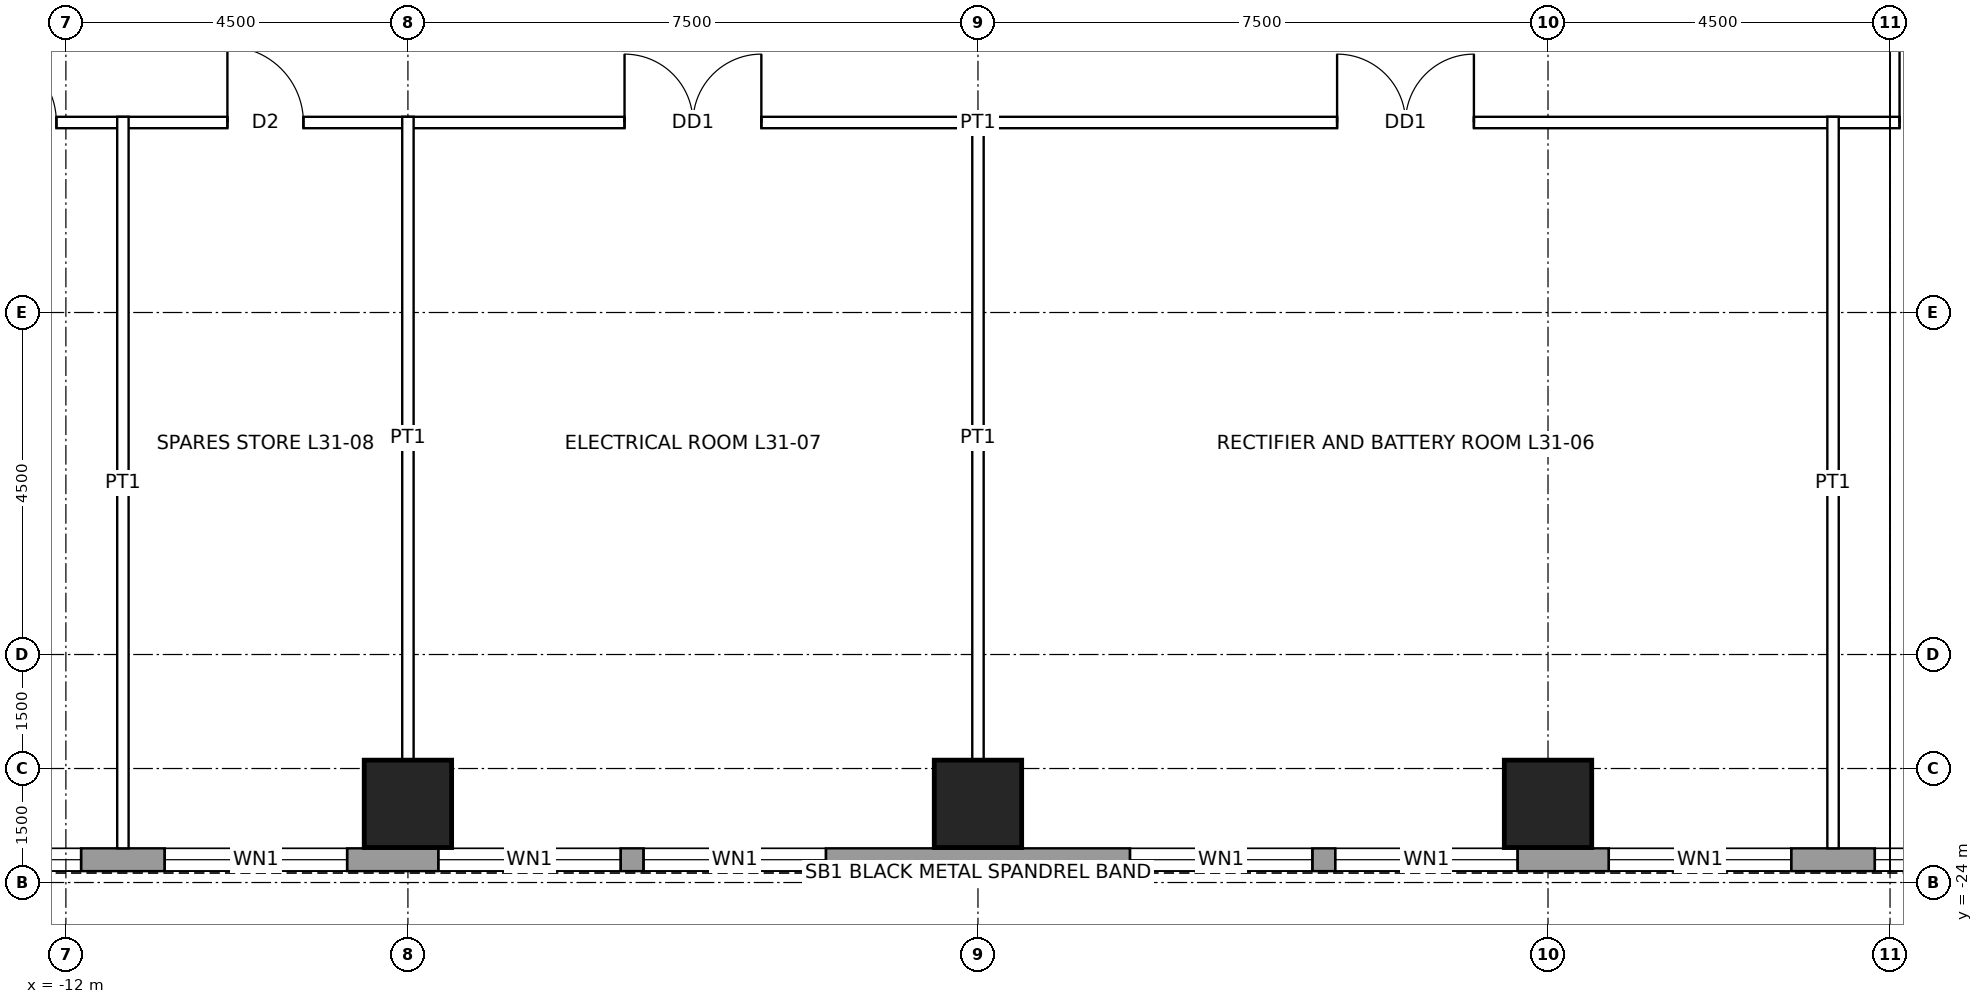
"""IFC4 building model, lengths in metres.
Left out: names, types, materials, properties, quantities, classifications, styles, units other than length and angle.
Written with IfcOpenShell. Run it as: python <this file> out.ifc"""

import sys

from ifc_helpers import new_model, si_unit, direction, frame, frame_2d, origin, origin_2d, place, context, subcontext, project, spatial, rectangle, hollow_rectangle, extrude, element, fill, save


model = new_model("IFC4")
c1 = context("Model", 3, precision=1e-05, world=origin(), true_north=direction((0.0, 1.0)))
c2 = subcontext(c1, "Body", "Model", "MODEL_VIEW")
j1 = project(units=[si_unit("LENGTHUNIT", "METRE"), si_unit("PLANEANGLEUNIT", "RADIAN")], contexts=[c1])
p1 = place(None, origin())
s1 = spatial("IfcSite", under=j1, at=p1, CompositionType="ELEMENT")
p2 = place(p1, origin())
s2 = spatial("IfcBuilding", under=s1, at=p2, CompositionType="ELEMENT")
p3 = place(p2, frame((0.0, 0.0, 153.9)))
s3 = spatial("IfcBuildingStorey", under=s2, at=p3, CompositionType="ELEMENT", Elevation=153.9)
for number, where, z_axis, x_axis in (
    (1, (7.5, -22.965, 0.0), (0.0, 0.0, 1.0), (1.0, 0.0, 0.0)),
    (2, (0.0, -22.965, 0.0), (0.0, 0.0, 1.0), (1.0, 0.0, 0.0)),
    (3, (-7.5, -22.965, 0.0), (0.0, 0.0, 1.0), (1.0, 0.0, 0.0)),
):
    element("IfcColumn", number, at=place(p3, frame(where, z_axis=z_axis, x_axis=x_axis)), inside=s3, PredefinedType="COLUMN", context=c2, shape_type="SweptSolid", body=[
        extrude(hollow_rectangle(XDim=1.15, YDim=1.15, WallThickness=0.075, at=origin_2d()), origin(), (0.0, 0.0, 1.0), 4.5),
    ])
p4 = place(p3, frame((16.2, -23.7, 0.0), z_axis=(0.0, 0.0, 1.0), x_axis=(-1.0, 0.0, 0.0)))
e4 = element("IfcWall", 4, at=p4, inside=s3, PredefinedType="SOLIDWALL", context=c2, shape_type="SweptSolid", body=[
    extrude(rectangle(XDim=32.4, YDim=0.3, at=frame_2d((16.2, 0.0))), origin(), (0.0, 0.0, 1.0), 4.3),
])
p5 = place(p4, frame((2.0, 0.0, 1.0)))
e5 = element("IfcOpeningElement", 5, at=p5, cuts=e4, PredefinedType="OPENING", context=c2, shape_type="SweptSolid", body=[
    extrude(rectangle(XDim=2.4, YDim=1.2, at=frame_2d((1.2, 0.6))), frame((0.0, 0.16, 0.0), z_axis=(0.0, -1.0, 0.0), x_axis=(1.0, 0.0, 0.0)), (0.0, 0.0, 1.0), 0.32),
])
p6 = place(p4, frame((5.5, 0.0, 1.0)))
e6 = element("IfcOpeningElement", 6, at=p6, cuts=e4, PredefinedType="OPENING", context=c2, shape_type="SweptSolid", body=[
    extrude(rectangle(XDim=2.4, YDim=1.2, at=frame_2d((1.2, 0.6))), frame((0.0, 0.16, 0.0), z_axis=(0.0, -1.0, 0.0), x_axis=(1.0, 0.0, 0.0)), (0.0, 0.0, 1.0), 0.32),
])
p7 = place(p4, frame((9.1, 0.0, 1.0)))
e7 = element("IfcOpeningElement", 7, at=p7, cuts=e4, PredefinedType="OPENING", context=c2, shape_type="SweptSolid", body=[
    extrude(rectangle(XDim=2.4, YDim=1.2, at=frame_2d((1.2, 0.6))), frame((0.0, 0.16, 0.0), z_axis=(0.0, -1.0, 0.0), x_axis=(1.0, 0.0, 0.0)), (0.0, 0.0, 1.0), 0.32),
])
p8 = place(p4, frame((11.8, 0.0, 1.0)))
e8 = element("IfcOpeningElement", 8, at=p8, cuts=e4, PredefinedType="OPENING", context=c2, shape_type="SweptSolid", body=[
    extrude(rectangle(XDim=2.4, YDim=1.2, at=frame_2d((1.2, 0.6))), frame((0.0, 0.16, 0.0), z_axis=(0.0, -1.0, 0.0), x_axis=(1.0, 0.0, 0.0)), (0.0, 0.0, 1.0), 0.32),
])
p9 = place(p4, frame((18.2, 0.0, 1.0)))
e9 = element("IfcOpeningElement", 9, at=p9, cuts=e4, PredefinedType="OPENING", context=c2, shape_type="SweptSolid", body=[
    extrude(rectangle(XDim=2.4, YDim=1.2, at=frame_2d((1.2, 0.6))), frame((0.0, 0.16, 0.0), z_axis=(0.0, -1.0, 0.0), x_axis=(1.0, 0.0, 0.0)), (0.0, 0.0, 1.0), 0.32),
])
p10 = place(p4, frame((20.9, 0.0, 1.0)))
e10 = element("IfcOpeningElement", 10, at=p10, cuts=e4, PredefinedType="OPENING", context=c2, shape_type="SweptSolid", body=[
    extrude(rectangle(XDim=2.4, YDim=1.2, at=frame_2d((1.2, 0.6))), frame((0.0, 0.16, 0.0), z_axis=(0.0, -1.0, 0.0), x_axis=(1.0, 0.0, 0.0)), (0.0, 0.0, 1.0), 0.32),
])
p11 = place(p4, frame((24.5, 0.0, 1.0)))
e11 = element("IfcOpeningElement", 11, at=p11, cuts=e4, PredefinedType="OPENING", context=c2, shape_type="SweptSolid", body=[
    extrude(rectangle(XDim=2.4, YDim=1.2, at=frame_2d((1.2, 0.6))), frame((0.0, 0.16, 0.0), z_axis=(0.0, -1.0, 0.0), x_axis=(1.0, 0.0, 0.0)), (0.0, 0.0, 1.0), 0.32),
])
p12 = place(p4, frame((28.0, 0.0, 1.0)))
e12 = element("IfcOpeningElement", 12, at=p12, cuts=e4, PredefinedType="OPENING", context=c2, shape_type="SweptSolid", body=[
    extrude(rectangle(XDim=2.4, YDim=1.2, at=frame_2d((1.2, 0.6))), frame((0.0, 0.16, 0.0), z_axis=(0.0, -1.0, 0.0), x_axis=(1.0, 0.0, 0.0)), (0.0, 0.0, 1.0), 0.32),
])
p13 = place(p3, frame((-14.075, -14.0, 0.0), z_axis=(0.0, 0.0, 1.0), x_axis=(1.0, 0.0, 0.0)))
e13 = element("IfcWall", 13, at=p13, inside=s3, PredefinedType="PARTITIONING", context=c2, shape_type="SweptSolid", body=[
    extrude(rectangle(XDim=28.15, YDim=0.15, at=frame_2d((14.075, 0.0))), origin(), (0.0, 0.0, 1.0), 4.3),
])
p14 = place(p13, frame((18.8, 0.0, 0.0)))
e14 = element("IfcOpeningElement", 14, at=p14, cuts=e13, PredefinedType="OPENING", context=c2, shape_type="SweptSolid", body=[
    extrude(rectangle(XDim=1.8, YDim=2.4, at=frame_2d((0.9, 1.2))), frame((0.0, 0.085, 0.0), z_axis=(0.0, -1.0, 0.0), x_axis=(1.0, 0.0, 0.0)), (0.0, 0.0, 1.0), 0.17),
])
p15 = place(p13, frame((9.425, 0.0, 0.0)))
e15 = element("IfcOpeningElement", 15, at=p15, cuts=e13, PredefinedType="OPENING", context=c2, shape_type="SweptSolid", body=[
    extrude(rectangle(XDim=1.8, YDim=2.4, at=frame_2d((0.9, 1.2))), frame((0.0, 0.085, 0.0), z_axis=(0.0, -1.0, 0.0), x_axis=(1.0, 0.0, 0.0)), (0.0, 0.0, 1.0), 0.17),
])
p16 = place(p13, frame((4.2, 0.0, 0.0)))
e16 = element("IfcOpeningElement", 16, at=p16, cuts=e13, PredefinedType="OPENING", context=c2, shape_type="SweptSolid", body=[
    extrude(rectangle(XDim=1.0, YDim=2.1, at=frame_2d((0.5, 1.05))), frame((0.0, 0.085, 0.0), z_axis=(0.0, -1.0, 0.0), x_axis=(1.0, 0.0, 0.0)), (0.0, 0.0, 1.0), 0.17),
])
p17 = place(p13, frame((26.2, 0.0, 0.0)))
e17 = element("IfcOpeningElement", 17, at=p17, cuts=e13, PredefinedType="OPENING", context=c2, shape_type="SweptSolid", body=[
    extrude(rectangle(XDim=1.0, YDim=2.1, at=frame_2d((0.5, 1.05))), frame((0.0, 0.085, 0.0), z_axis=(0.0, -1.0, 0.0), x_axis=(1.0, 0.0, 0.0)), (0.0, 0.0, 1.0), 0.17),
])
p18 = place(p13, frame((0.95, 0.0, 0.0)))
e18 = element("IfcOpeningElement", 18, at=p18, cuts=e13, PredefinedType="OPENING", context=c2, shape_type="SweptSolid", body=[
    extrude(rectangle(XDim=1.0, YDim=2.1, at=frame_2d((0.5, 1.05))), frame((0.0, 0.085, 0.0), z_axis=(0.0, -1.0, 0.0), x_axis=(1.0, 0.0, 0.0)), (0.0, 0.0, 1.0), 0.17),
])
p19 = place(p3, frame((-11.25, -23.55, 0.0), z_axis=(0.0, 0.0, 1.0), x_axis=(0.0, 1.0, 0.0)))
e19 = element("IfcWall", 19, at=p19, inside=s3, PredefinedType="PARTITIONING", context=c2, shape_type="SweptSolid", body=[
    extrude(rectangle(XDim=9.625, YDim=0.15, at=frame_2d((4.812, 0.0))), origin(), (0.0, 0.0, 1.0), 3.431),
])
for number, where, z_axis, x_axis in (
    (20, (-7.5, -22.39, 0.0), (0.0, 0.0, 1.0), (0.0, 1.0, 0.0)),
    (21, (0.0, -22.39, 0.0), (0.0, 0.0, 1.0), (0.0, 1.0, 0.0)),
):
    element("IfcWall", number, at=place(p3, frame(where, z_axis=z_axis, x_axis=x_axis)), inside=s3, PredefinedType="PARTITIONING", context=c2, shape_type="SweptSolid", body=[
        extrude(rectangle(XDim=8.465, YDim=0.15, at=frame_2d((4.232, 0.0))), origin(), (0.0, 0.0, 1.0), 3.431),
    ])
p20 = place(p3, frame((11.25, -23.55, 0.0), z_axis=(0.0, 0.0, 1.0), x_axis=(0.0, 1.0, 0.0)))
e22 = element("IfcWall", 22, at=p20, inside=s3, PredefinedType="PARTITIONING", context=c2, shape_type="SweptSolid", body=[
    extrude(rectangle(XDim=9.625, YDim=0.15, at=frame_2d((4.812, 0.0))), origin(), (0.0, 0.0, 1.0), 3.431),
])
p21 = place(p5, origin())
e23 = element("IfcWindow", 23, at=p21, inside=s3, PartitioningType="SINGLE_PANEL", PredefinedType="WINDOW", context=c2, shape_type="SweptSolid", body=[
    extrude(rectangle(XDim=2.4, YDim=1.2, at=frame_2d((1.2, 0.6))), frame((0.0, 0.03, 0.0), z_axis=(0.0, -1.0, 0.0), x_axis=(1.0, 0.0, 0.0)), (0.0, 0.0, 1.0), 0.06),
])
fill(e5, e23)
p22 = place(p6, origin())
e24 = element("IfcWindow", 24, at=p22, inside=s3, PartitioningType="SINGLE_PANEL", PredefinedType="WINDOW", context=c2, shape_type="SweptSolid", body=[
    extrude(rectangle(XDim=2.4, YDim=1.2, at=frame_2d((1.2, 0.6))), frame((0.0, 0.03, 0.0), z_axis=(0.0, -1.0, 0.0), x_axis=(1.0, 0.0, 0.0)), (0.0, 0.0, 1.0), 0.06),
])
fill(e6, e24)
p23 = place(p7, origin())
e25 = element("IfcWindow", 25, at=p23, inside=s3, PartitioningType="SINGLE_PANEL", PredefinedType="WINDOW", context=c2, shape_type="SweptSolid", body=[
    extrude(rectangle(XDim=2.4, YDim=1.2, at=frame_2d((1.2, 0.6))), frame((0.0, 0.03, 0.0), z_axis=(0.0, -1.0, 0.0), x_axis=(1.0, 0.0, 0.0)), (0.0, 0.0, 1.0), 0.06),
])
fill(e7, e25)
p24 = place(p8, origin())
e26 = element("IfcWindow", 26, at=p24, inside=s3, PartitioningType="SINGLE_PANEL", PredefinedType="WINDOW", context=c2, shape_type="SweptSolid", body=[
    extrude(rectangle(XDim=2.4, YDim=1.2, at=frame_2d((1.2, 0.6))), frame((0.0, 0.03, 0.0), z_axis=(0.0, -1.0, 0.0), x_axis=(1.0, 0.0, 0.0)), (0.0, 0.0, 1.0), 0.06),
])
fill(e8, e26)
p25 = place(p9, origin())
e27 = element("IfcWindow", 27, at=p25, inside=s3, PartitioningType="SINGLE_PANEL", PredefinedType="WINDOW", context=c2, shape_type="SweptSolid", body=[
    extrude(rectangle(XDim=2.4, YDim=1.2, at=frame_2d((1.2, 0.6))), frame((0.0, 0.03, 0.0), z_axis=(0.0, -1.0, 0.0), x_axis=(1.0, 0.0, 0.0)), (0.0, 0.0, 1.0), 0.06),
])
fill(e9, e27)
p26 = place(p10, origin())
e28 = element("IfcWindow", 28, at=p26, inside=s3, PartitioningType="SINGLE_PANEL", PredefinedType="WINDOW", context=c2, shape_type="SweptSolid", body=[
    extrude(rectangle(XDim=2.4, YDim=1.2, at=frame_2d((1.2, 0.6))), frame((0.0, 0.03, 0.0), z_axis=(0.0, -1.0, 0.0), x_axis=(1.0, 0.0, 0.0)), (0.0, 0.0, 1.0), 0.06),
])
fill(e10, e28)
p27 = place(p11, origin())
e29 = element("IfcWindow", 29, at=p27, inside=s3, PartitioningType="SINGLE_PANEL", PredefinedType="WINDOW", context=c2, shape_type="SweptSolid", body=[
    extrude(rectangle(XDim=2.4, YDim=1.2, at=frame_2d((1.2, 0.6))), frame((0.0, 0.03, 0.0), z_axis=(0.0, -1.0, 0.0), x_axis=(1.0, 0.0, 0.0)), (0.0, 0.0, 1.0), 0.06),
])
fill(e11, e29)
p28 = place(p12, origin())
e30 = element("IfcWindow", 30, at=p28, inside=s3, PartitioningType="SINGLE_PANEL", PredefinedType="WINDOW", context=c2, shape_type="SweptSolid", body=[
    extrude(rectangle(XDim=2.4, YDim=1.2, at=frame_2d((1.2, 0.6))), frame((0.0, 0.03, 0.0), z_axis=(0.0, -1.0, 0.0), x_axis=(1.0, 0.0, 0.0)), (0.0, 0.0, 1.0), 0.06),
])
fill(e12, e30)
p29 = place(p14, origin())
e31 = element("IfcDoor", 31, at=p29, inside=s3, OperationType="DOUBLE_DOOR_SINGLE_SWING", PredefinedType="DOOR", context=c2, shape_type="SweptSolid", body=[
    extrude(rectangle(XDim=1.8, YDim=2.4, at=frame_2d((0.9, 1.2))), frame((0.0, 0.025, 0.0), z_axis=(0.0, -1.0, 0.0), x_axis=(1.0, 0.0, 0.0)), (0.0, 0.0, 1.0), 0.05),
])
fill(e14, e31)
p30 = place(p15, origin())
e32 = element("IfcDoor", 32, at=p30, inside=s3, OperationType="DOUBLE_DOOR_SINGLE_SWING", PredefinedType="DOOR", context=c2, shape_type="SweptSolid", body=[
    extrude(rectangle(XDim=1.8, YDim=2.4, at=frame_2d((0.9, 1.2))), frame((0.0, 0.025, 0.0), z_axis=(0.0, -1.0, 0.0), x_axis=(1.0, 0.0, 0.0)), (0.0, 0.0, 1.0), 0.05),
])
fill(e15, e32)
p31 = place(p16, origin())
e33 = element("IfcDoor", 33, at=p31, inside=s3, OperationType="SINGLE_SWING_LEFT", PredefinedType="DOOR", context=c2, shape_type="SweptSolid", body=[
    extrude(rectangle(XDim=1.0, YDim=2.1, at=frame_2d((0.5, 1.05))), frame((0.0, 0.025, 0.0), z_axis=(0.0, -1.0, 0.0), x_axis=(1.0, 0.0, 0.0)), (0.0, 0.0, 1.0), 0.05),
])
fill(e16, e33)
p32 = place(p17, origin())
e34 = element("IfcDoor", 34, at=p32, inside=s3, OperationType="SINGLE_SWING_LEFT", PredefinedType="DOOR", context=c2, shape_type="SweptSolid", body=[
    extrude(rectangle(XDim=1.0, YDim=2.1, at=frame_2d((0.5, 1.05))), frame((0.0, 0.025, 0.0), z_axis=(0.0, -1.0, 0.0), x_axis=(1.0, 0.0, 0.0)), (0.0, 0.0, 1.0), 0.05),
])
fill(e17, e34)
p33 = place(p18, origin())
e35 = element("IfcDoor", 35, at=p33, inside=s3, OperationType="SINGLE_SWING_LEFT", PredefinedType="DOOR", context=c2, shape_type="SweptSolid", body=[
    extrude(rectangle(XDim=1.0, YDim=2.1, at=frame_2d((0.5, 1.05))), frame((0.0, 0.025, 0.0), z_axis=(0.0, -1.0, 0.0), x_axis=(1.0, 0.0, 0.0)), (0.0, 0.0, 1.0), 0.05),
])
fill(e18, e35)
save(model, sys.argv[1])
